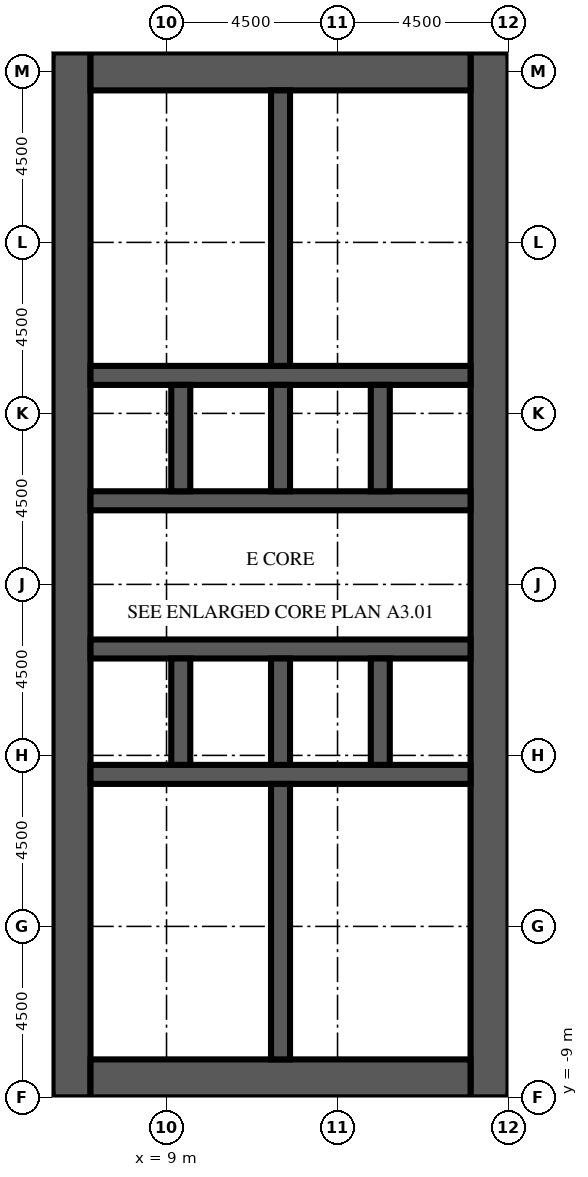
"""IFC4 building model, lengths in metres.
Left out: names, types, materials, properties, quantities, classifications, styles, units other than length and angle.
Written with IfcOpenShell. Run it as: python <this file> out.ifc"""

import sys

from ifc_helpers import new_model, si_unit, direction, frame, frame_2d, origin, place, context, subcontext, project, spatial, rectangle, extrude, element, fill, save


model = new_model("IFC4")
c1 = context("Model", 3, precision=1e-05, world=origin(), true_north=direction((0.0, 1.0)))
c2 = subcontext(c1, "Body", "Model", "MODEL_VIEW")
j1 = project(units=[si_unit("LENGTHUNIT", "METRE"), si_unit("PLANEANGLEUNIT", "RADIAN")], contexts=[c1])
p1 = place(None, origin())
s1 = spatial("IfcSite", under=j1, at=p1, CompositionType="ELEMENT")
p2 = place(p1, origin())
s2 = spatial("IfcBuilding", under=s1, at=p2, CompositionType="ELEMENT")
p3 = place(p2, frame((0.0, 0.0, -10.0)))
s3 = spatial("IfcBuildingStorey", under=s2, at=p3, CompositionType="ELEMENT", Elevation=-10.0)
p4 = place(p3, frame((6.5, -9.0, 0.0), z_axis=(0.0, 0.0, 1.0), x_axis=(0.0, 1.0, 0.0)))
e1 = element("IfcWall", 1, at=p4, inside=s3, PredefinedType="SHEAR", context=c2, shape_type="SweptSolid", body=[
    extrude(rectangle(XDim=27.5, YDim=1.0, at=frame_2d((13.75, 0.0))), origin(), (0.0, 0.0, 1.0), 5.0),
])
p5 = place(p4, frame((12.55, 0.0, 0.0)))
e2 = element("IfcOpeningElement", 2, at=p5, cuts=e1, PredefinedType="OPENING", context=c2, shape_type="SweptSolid", body=[
    extrude(rectangle(XDim=2.4, YDim=2.4, at=frame_2d((1.2, 1.2))), frame((0.0, 0.51, 0.0), z_axis=(0.0, -1.0, 0.0), x_axis=(1.0, 0.0, 0.0)), (0.0, 0.0, 1.0), 1.02),
])
p6 = place(p4, frame((4.025, 0.0, 0.0)))
e3 = element("IfcOpeningElement", 3, at=p6, cuts=e1, PredefinedType="OPENING", context=c2, shape_type="SweptSolid", body=[
    extrude(rectangle(XDim=1.2, YDim=2.1, at=frame_2d((0.6, 1.05))), frame((0.0, 0.51, 0.0), z_axis=(0.0, -1.0, 0.0), x_axis=(1.0, 0.0, 0.0)), (0.0, 0.0, 1.0), 1.02),
])
p7 = place(p4, frame((19.475, 0.0, 0.0)))
e4 = element("IfcOpeningElement", 4, at=p7, cuts=e1, PredefinedType="OPENING", context=c2, shape_type="SweptSolid", body=[
    extrude(rectangle(XDim=1.0, YDim=2.1, at=frame_2d((0.5, 1.05))), frame((0.0, 0.51, 0.0), z_axis=(0.0, -1.0, 0.0), x_axis=(1.0, 0.0, 0.0)), (0.0, 0.0, 1.0), 1.02),
])
p8 = place(p4, frame((21.106, 0.0, 0.0)))
e5 = element("IfcOpeningElement", 5, at=p8, cuts=e1, PredefinedType="OPENING", context=c2, shape_type="SweptSolid", body=[
    extrude(rectangle(XDim=1.0, YDim=2.1, at=frame_2d((0.5, 1.05))), frame((0.0, 0.51, 0.0), z_axis=(0.0, -1.0, 0.0), x_axis=(1.0, 0.0, 0.0)), (0.0, 0.0, 1.0), 1.02),
])
p9 = place(p4, frame((23.1, 0.0, 0.0)))
e6 = element("IfcOpeningElement", 6, at=p9, cuts=e1, PredefinedType="OPENING", context=c2, shape_type="SweptSolid", body=[
    extrude(rectangle(XDim=1.0, YDim=2.1, at=frame_2d((0.5, 1.05))), frame((0.0, 0.51, 0.0), z_axis=(0.0, -1.0, 0.0), x_axis=(1.0, 0.0, 0.0)), (0.0, 0.0, 1.0), 1.02),
])
p10 = place(p4, frame((25.094, 0.0, 0.0)))
e7 = element("IfcOpeningElement", 7, at=p10, cuts=e1, PredefinedType="OPENING", context=c2, shape_type="SweptSolid", body=[
    extrude(rectangle(XDim=1.0, YDim=2.1, at=frame_2d((0.5, 1.05))), frame((0.0, 0.51, 0.0), z_axis=(0.0, -1.0, 0.0), x_axis=(1.0, 0.0, 0.0)), (0.0, 0.0, 1.0), 1.02),
])
p11 = place(p3, frame((17.5, -9.0, 0.0), z_axis=(0.0, 0.0, 1.0), x_axis=(0.0, 1.0, 0.0)))
e8 = element("IfcWall", 8, at=p11, inside=s3, PredefinedType="SHEAR", context=c2, shape_type="SweptSolid", body=[
    extrude(rectangle(XDim=27.5, YDim=1.0, at=frame_2d((13.75, 0.0))), origin(), (0.0, 0.0, 1.0), 5.0),
])
p12 = place(p11, frame((12.55, 0.0, 0.0)))
e9 = element("IfcOpeningElement", 9, at=p12, cuts=e8, PredefinedType="OPENING", context=c2, shape_type="SweptSolid", body=[
    extrude(rectangle(XDim=2.4, YDim=2.4, at=frame_2d((1.2, 1.2))), frame((0.0, 0.51, 0.0), z_axis=(0.0, -1.0, 0.0), x_axis=(1.0, 0.0, 0.0)), (0.0, 0.0, 1.0), 1.02),
])
p13 = place(p11, frame((6.825, 0.0, 0.0)))
e10 = element("IfcOpeningElement", 10, at=p13, cuts=e8, PredefinedType="OPENING", context=c2, shape_type="SweptSolid", body=[
    extrude(rectangle(XDim=1.2, YDim=2.1, at=frame_2d((0.6, 1.05))), frame((0.0, 0.51, 0.0), z_axis=(0.0, -1.0, 0.0), x_axis=(1.0, 0.0, 0.0)), (0.0, 0.0, 1.0), 1.02),
])
p14 = place(p11, frame((19.475, 0.0, 0.0)))
e11 = element("IfcOpeningElement", 11, at=p14, cuts=e8, PredefinedType="OPENING", context=c2, shape_type="SweptSolid", body=[
    extrude(rectangle(XDim=1.2, YDim=2.1, at=frame_2d((0.6, 1.05))), frame((0.0, 0.51, 0.0), z_axis=(0.0, -1.0, 0.0), x_axis=(1.0, 0.0, 0.0)), (0.0, 0.0, 1.0), 1.02),
])
for number, where, z_axis, x_axis in (
    (12, (7.0, -8.5, 0.0), (0.0, 0.0, 1.0), (1.0, 0.0, 0.0)),
    (13, (7.0, 18.0, 0.0), (0.0, 0.0, 1.0), (1.0, 0.0, 0.0)),
):
    element("IfcWall", number, at=place(p3, frame(where, z_axis=z_axis, x_axis=x_axis)), inside=s3, PredefinedType="SHEAR", context=c2, shape_type="SweptSolid", body=[
        extrude(rectangle(XDim=10.0, YDim=1.0, at=frame_2d((5.0, 0.0))), origin(), (0.0, 0.0, 1.0), 5.0),
    ])
p15 = place(p3, frame((7.0, -0.5, 0.0), z_axis=(0.0, 0.0, 1.0), x_axis=(1.0, 0.0, 0.0)))
e14 = element("IfcWall", 14, at=p15, inside=s3, PredefinedType="SHEAR", context=c2, shape_type="SweptSolid", body=[
    extrude(rectangle(XDim=10.0, YDim=0.5, at=frame_2d((5.0, 0.0))), origin(), (0.0, 0.0, 1.0), 5.0),
])
p16 = place(p3, frame((7.0, 2.8, 0.0), z_axis=(0.0, 0.0, 1.0), x_axis=(1.0, 0.0, 0.0)))
e15 = element("IfcWall", 15, at=p16, inside=s3, PredefinedType="SHEAR", context=c2, shape_type="SweptSolid", body=[
    extrude(rectangle(XDim=10.0, YDim=0.5, at=frame_2d((5.0, 0.0))), origin(), (0.0, 0.0, 1.0), 5.0),
])
p17 = place(p16, frame((0.512, 0.0, 0.0)))
e16 = element("IfcOpeningElement", 16, at=p17, cuts=e15, PredefinedType="OPENING", context=c2, shape_type="SweptSolid", body=[
    extrude(rectangle(XDim=1.1, YDim=2.1, at=frame_2d((0.55, 1.05))), frame((0.0, 0.26, 0.0), z_axis=(0.0, -1.0, 0.0), x_axis=(1.0, 0.0, 0.0)), (0.0, 0.0, 1.0), 0.52),
])
p18 = place(p16, frame((3.137, 0.0, 0.0)))
e17 = element("IfcOpeningElement", 17, at=p18, cuts=e15, PredefinedType="OPENING", context=c2, shape_type="SweptSolid", body=[
    extrude(rectangle(XDim=1.1, YDim=2.1, at=frame_2d((0.55, 1.05))), frame((0.0, 0.26, 0.0), z_axis=(0.0, -1.0, 0.0), x_axis=(1.0, 0.0, 0.0)), (0.0, 0.0, 1.0), 0.52),
])
p19 = place(p16, frame((8.387, 0.0, 0.0)))
e18 = element("IfcOpeningElement", 18, at=p19, cuts=e15, PredefinedType="OPENING", context=c2, shape_type="SweptSolid", body=[
    extrude(rectangle(XDim=1.1, YDim=2.1, at=frame_2d((0.55, 1.05))), frame((0.0, 0.26, 0.0), z_axis=(0.0, -1.0, 0.0), x_axis=(1.0, 0.0, 0.0)), (0.0, 0.0, 1.0), 0.52),
])
p20 = place(p16, frame((5.812, 0.0, 0.0)))
e19 = element("IfcOpeningElement", 19, at=p20, cuts=e15, PredefinedType="OPENING", context=c2, shape_type="SweptSolid", body=[
    extrude(rectangle(XDim=1.0, YDim=2.1, at=frame_2d((0.5, 1.05))), frame((0.0, 0.26, 0.0), z_axis=(0.0, -1.0, 0.0), x_axis=(1.0, 0.0, 0.0)), (0.0, 0.0, 1.0), 0.52),
])
p21 = place(p3, frame((7.0, 6.7, 0.0), z_axis=(0.0, 0.0, 1.0), x_axis=(1.0, 0.0, 0.0)))
e20 = element("IfcWall", 20, at=p21, inside=s3, PredefinedType="SHEAR", context=c2, shape_type="SweptSolid", body=[
    extrude(rectangle(XDim=10.0, YDim=0.5, at=frame_2d((5.0, 0.0))), origin(), (0.0, 0.0, 1.0), 5.0),
])
p22 = place(p21, frame((0.512, 0.0, 0.0)))
e21 = element("IfcOpeningElement", 21, at=p22, cuts=e20, PredefinedType="OPENING", context=c2, shape_type="SweptSolid", body=[
    extrude(rectangle(XDim=1.1, YDim=2.1, at=frame_2d((0.55, 1.05))), frame((0.0, 0.26, 0.0), z_axis=(0.0, -1.0, 0.0), x_axis=(1.0, 0.0, 0.0)), (0.0, 0.0, 1.0), 0.52),
])
p23 = place(p21, frame((3.188, 0.0, 0.0)))
e22 = element("IfcOpeningElement", 22, at=p23, cuts=e20, PredefinedType="OPENING", context=c2, shape_type="SweptSolid", body=[
    extrude(rectangle(XDim=1.0, YDim=2.1, at=frame_2d((0.5, 1.05))), frame((0.0, 0.26, 0.0), z_axis=(0.0, -1.0, 0.0), x_axis=(1.0, 0.0, 0.0)), (0.0, 0.0, 1.0), 0.52),
])
p24 = place(p21, frame((5.812, 0.0, 0.0)))
e23 = element("IfcOpeningElement", 23, at=p24, cuts=e20, PredefinedType="OPENING", context=c2, shape_type="SweptSolid", body=[
    extrude(rectangle(XDim=1.0, YDim=2.1, at=frame_2d((0.5, 1.05))), frame((0.0, 0.26, 0.0), z_axis=(0.0, -1.0, 0.0), x_axis=(1.0, 0.0, 0.0)), (0.0, 0.0, 1.0), 0.52),
])
p25 = place(p21, frame((8.438, 0.0, 0.0)))
e24 = element("IfcOpeningElement", 24, at=p25, cuts=e20, PredefinedType="OPENING", context=c2, shape_type="SweptSolid", body=[
    extrude(rectangle(XDim=1.0, YDim=2.1, at=frame_2d((0.5, 1.05))), frame((0.0, 0.26, 0.0), z_axis=(0.0, -1.0, 0.0), x_axis=(1.0, 0.0, 0.0)), (0.0, 0.0, 1.0), 0.52),
])
p26 = place(p3, frame((7.0, 10.0, 0.0), z_axis=(0.0, 0.0, 1.0), x_axis=(1.0, 0.0, 0.0)))
e25 = element("IfcWall", 25, at=p26, inside=s3, PredefinedType="SHEAR", context=c2, shape_type="SweptSolid", body=[
    extrude(rectangle(XDim=10.0, YDim=0.5, at=frame_2d((5.0, 0.0))), origin(), (0.0, 0.0, 1.0), 5.0),
])
for number, where, z_axis, x_axis in (
    (26, (9.375, -0.25, 0.0), (0.0, 0.0, 1.0), (0.0, 1.0, 0.0)),
    (27, (9.375, 6.95, 0.0), (0.0, 0.0, 1.0), (0.0, 1.0, 0.0)),
    (28, (12.0, -0.25, 0.0), (0.0, 0.0, 1.0), (0.0, 1.0, 0.0)),
    (29, (12.0, 6.95, 0.0), (0.0, 0.0, 1.0), (0.0, 1.0, 0.0)),
    (30, (14.625, -0.25, 0.0), (0.0, 0.0, 1.0), (0.0, 1.0, 0.0)),
    (31, (14.625, 6.95, 0.0), (0.0, 0.0, 1.0), (0.0, 1.0, 0.0)),
):
    element("IfcWall", number, at=place(p3, frame(where, z_axis=z_axis, x_axis=x_axis)), inside=s3, PredefinedType="SHEAR", context=c2, shape_type="SweptSolid", body=[
        extrude(rectangle(XDim=2.8, YDim=0.5, at=frame_2d((1.4, 0.0))), origin(), (0.0, 0.0, 1.0), 5.0),
    ])
for number, where, z_axis, x_axis in (
    (32, (12.0, -8.0, 0.0), (0.0, 0.0, 1.0), (0.0, 1.0, 0.0)),
    (33, (12.0, 10.25, 0.0), (0.0, 0.0, 1.0), (0.0, 1.0, 0.0)),
):
    element("IfcWall", number, at=place(p3, frame(where, z_axis=z_axis, x_axis=x_axis)), inside=s3, PredefinedType="SHEAR", context=c2, shape_type="SweptSolid", body=[
        extrude(rectangle(XDim=7.25, YDim=0.5, at=frame_2d((3.625, 0.0))), origin(), (0.0, 0.0, 1.0), 5.0),
    ])
p27 = place(p3, frame((7.0, -5.825, 0.0), z_axis=(0.0, 0.0, 1.0), x_axis=(1.0, 0.0, 0.0)))
e34 = element("IfcWall", 34, at=p27, inside=s3, PredefinedType="PARTITIONING", context=c2, shape_type="SweptSolid", body=[
    extrude(rectangle(XDim=1.6, YDim=0.1, at=frame_2d((0.8, 0.0))), origin(), (0.0, 0.0, 1.0), 4.6),
])
p28 = place(p27, frame((0.3, 0.0, 0.0)))
e35 = element("IfcOpeningElement", 35, at=p28, cuts=e34, PredefinedType="OPENING", context=c2, shape_type="SweptSolid", body=[
    extrude(rectangle(XDim=1.0, YDim=2.1, at=frame_2d((0.5, 1.05))), frame((0.0, 0.06, 0.0), z_axis=(0.0, -1.0, 0.0), x_axis=(1.0, 0.0, 0.0)), (0.0, 0.0, 1.0), 0.12),
])
p29 = place(p3, frame((7.0, -2.925, 0.0), z_axis=(0.0, 0.0, 1.0), x_axis=(1.0, 0.0, 0.0)))
e36 = element("IfcWall", 36, at=p29, inside=s3, PredefinedType="PARTITIONING", context=c2, shape_type="SweptSolid", body=[
    extrude(rectangle(XDim=1.6, YDim=0.1, at=frame_2d((0.8, 0.0))), origin(), (0.0, 0.0, 1.0), 4.6),
])
p30 = place(p29, frame((0.3, 0.0, 0.0)))
e37 = element("IfcOpeningElement", 37, at=p30, cuts=e36, PredefinedType="OPENING", context=c2, shape_type="SweptSolid", body=[
    extrude(rectangle(XDim=1.0, YDim=2.1, at=frame_2d((0.5, 1.05))), frame((0.0, 0.06, 0.0), z_axis=(0.0, -1.0, 0.0), x_axis=(1.0, 0.0, 0.0)), (0.0, 0.0, 1.0), 0.12),
])
p31 = place(p3, frame((8.6, -5.825, 0.0), z_axis=(0.0, 0.0, 1.0), x_axis=(0.0, 1.0, 0.0)))
e38 = element("IfcWall", 38, at=p31, inside=s3, PredefinedType="PARTITIONING", context=c2, shape_type="SweptSolid", body=[
    extrude(rectangle(XDim=2.9, YDim=0.1, at=frame_2d((1.45, 0.0))), origin(), (0.0, 0.0, 1.0), 4.6),
])
p32 = place(p31, frame((0.95, 0.0, 0.0)))
e39 = element("IfcOpeningElement", 39, at=p32, cuts=e38, PredefinedType="OPENING", context=c2, shape_type="SweptSolid", body=[
    extrude(rectangle(XDim=1.0, YDim=2.1, at=frame_2d((0.5, 1.05))), frame((0.0, 0.06, 0.0), z_axis=(0.0, -1.0, 0.0), x_axis=(1.0, 0.0, 0.0)), (0.0, 0.0, 1.0), 0.12),
])
for number, where, z_axis, x_axis in (
    (40, (8.6, -5.825, 0.0), (0.0, 0.0, 1.0), (1.0, 0.0, 0.0)),
    (41, (8.6, -2.925, 0.0), (0.0, 0.0, 1.0), (1.0, 0.0, 0.0)),
):
    element("IfcWall", number, at=place(p3, frame(where, z_axis=z_axis, x_axis=x_axis)), inside=s3, PredefinedType="PARTITIONING", context=c2, shape_type="SweptSolid", body=[
        extrude(rectangle(XDim=3.15, YDim=0.1, at=frame_2d((1.575, 0.0))), origin(), (0.0, 0.0, 1.0), 4.6),
    ])
for number, where, z_axis, x_axis in (
    (42, (7.0, 11.7, 0.0), (0.0, 0.0, 1.0), (1.0, 0.0, 0.0)),
    (43, (7.0, 13.512, 0.0), (0.0, 0.0, 1.0), (1.0, 0.0, 0.0)),
    (44, (7.0, 15.688, 0.0), (0.0, 0.0, 1.0), (1.0, 0.0, 0.0)),
):
    element("IfcWall", number, at=place(p3, frame(where, z_axis=z_axis, x_axis=x_axis)), inside=s3, PredefinedType="PARTITIONING", context=c2, shape_type="SweptSolid", body=[
        extrude(rectangle(XDim=4.75, YDim=0.1, at=frame_2d((2.375, 0.0))), origin(), (0.0, 0.0, 1.0), 4.6),
    ])
p33 = place(p17, origin())
e45 = element("IfcDoor", 45, at=p33, inside=s3, OperationType="DOUBLE_DOOR_SLIDING", PredefinedType="DOOR", context=c2, shape_type="SweptSolid", body=[
    extrude(rectangle(XDim=1.1, YDim=2.1, at=frame_2d((0.55, 1.05))), frame((0.0, 0.025, 0.0), z_axis=(0.0, -1.0, 0.0), x_axis=(1.0, 0.0, 0.0)), (0.0, 0.0, 1.0), 0.05),
])
fill(e16, e45)
p34 = place(p18, origin())
e46 = element("IfcDoor", 46, at=p34, inside=s3, OperationType="DOUBLE_DOOR_SLIDING", PredefinedType="DOOR", context=c2, shape_type="SweptSolid", body=[
    extrude(rectangle(XDim=1.1, YDim=2.1, at=frame_2d((0.55, 1.05))), frame((0.0, 0.025, 0.0), z_axis=(0.0, -1.0, 0.0), x_axis=(1.0, 0.0, 0.0)), (0.0, 0.0, 1.0), 0.05),
])
fill(e17, e46)
p35 = place(p19, origin())
e47 = element("IfcDoor", 47, at=p35, inside=s3, OperationType="DOUBLE_DOOR_SLIDING", PredefinedType="DOOR", context=c2, shape_type="SweptSolid", body=[
    extrude(rectangle(XDim=1.1, YDim=2.1, at=frame_2d((0.55, 1.05))), frame((0.0, 0.025, 0.0), z_axis=(0.0, -1.0, 0.0), x_axis=(1.0, 0.0, 0.0)), (0.0, 0.0, 1.0), 0.05),
])
fill(e18, e47)
p36 = place(p22, origin())
e48 = element("IfcDoor", 48, at=p36, inside=s3, OperationType="DOUBLE_DOOR_SLIDING", PredefinedType="DOOR", context=c2, shape_type="SweptSolid", body=[
    extrude(rectangle(XDim=1.1, YDim=2.1, at=frame_2d((0.55, 1.05))), frame((0.0, 0.025, 0.0), z_axis=(0.0, -1.0, 0.0), x_axis=(1.0, 0.0, 0.0)), (0.0, 0.0, 1.0), 0.05),
])
fill(e21, e48)
p37 = place(p5, origin())
e49 = element("IfcDoor", 49, at=p37, inside=s3, OperationType="DOUBLE_DOOR_DOUBLE_SWING", PredefinedType="DOOR", context=c2, shape_type="SweptSolid", body=[
    extrude(rectangle(XDim=2.4, YDim=2.4, at=frame_2d((1.2, 1.2))), frame((0.0, 0.025, 0.0), z_axis=(0.0, -1.0, 0.0), x_axis=(1.0, 0.0, 0.0)), (0.0, 0.0, 1.0), 0.05),
])
fill(e2, e49)
p38 = place(p12, origin())
e50 = element("IfcDoor", 50, at=p38, inside=s3, OperationType="DOUBLE_DOOR_DOUBLE_SWING", PredefinedType="DOOR", context=c2, shape_type="SweptSolid", body=[
    extrude(rectangle(XDim=2.4, YDim=2.4, at=frame_2d((1.2, 1.2))), frame((0.0, 0.025, 0.0), z_axis=(0.0, -1.0, 0.0), x_axis=(1.0, 0.0, 0.0)), (0.0, 0.0, 1.0), 0.05),
])
fill(e9, e50)
p39 = place(p13, frame((1.2, 0.0, 0.0), z_axis=(0.0, 0.0, 1.0), x_axis=(-1.0, 0.0, 0.0)))
e51 = element("IfcDoor", 51, at=p39, inside=s3, OperationType="SINGLE_SWING_LEFT", PredefinedType="DOOR", context=c2, shape_type="SweptSolid", body=[
    extrude(rectangle(XDim=1.2, YDim=2.1, at=frame_2d((0.6, 1.05))), frame((0.0, 0.025, 0.0), z_axis=(0.0, -1.0, 0.0), x_axis=(1.0, 0.0, 0.0)), (0.0, 0.0, 1.0), 0.05),
])
fill(e10, e51)
p40 = place(p14, frame((1.2, 0.0, 0.0), z_axis=(0.0, 0.0, 1.0), x_axis=(-1.0, 0.0, 0.0)))
e52 = element("IfcDoor", 52, at=p40, inside=s3, OperationType="SINGLE_SWING_LEFT", PredefinedType="DOOR", context=c2, shape_type="SweptSolid", body=[
    extrude(rectangle(XDim=1.2, YDim=2.1, at=frame_2d((0.6, 1.05))), frame((0.0, 0.025, 0.0), z_axis=(0.0, -1.0, 0.0), x_axis=(1.0, 0.0, 0.0)), (0.0, 0.0, 1.0), 0.05),
])
fill(e11, e52)
p41 = place(p20, origin())
e53 = element("IfcDoor", 53, at=p41, inside=s3, OperationType="SINGLE_SWING_LEFT", PredefinedType="DOOR", context=c2, shape_type="SweptSolid", body=[
    extrude(rectangle(XDim=1.0, YDim=2.1, at=frame_2d((0.5, 1.05))), frame((0.0, 0.025, 0.0), z_axis=(0.0, -1.0, 0.0), x_axis=(1.0, 0.0, 0.0)), (0.0, 0.0, 1.0), 0.05),
])
fill(e19, e53)
p42 = place(p23, origin())
e54 = element("IfcDoor", 54, at=p42, inside=s3, OperationType="SINGLE_SWING_RIGHT", PredefinedType="DOOR", context=c2, shape_type="SweptSolid", body=[
    extrude(rectangle(XDim=1.0, YDim=2.1, at=frame_2d((0.5, 1.05))), frame((0.0, 0.025, 0.0), z_axis=(0.0, -1.0, 0.0), x_axis=(1.0, 0.0, 0.0)), (0.0, 0.0, 1.0), 0.05),
])
fill(e22, e54)
p43 = place(p24, origin())
e55 = element("IfcDoor", 55, at=p43, inside=s3, OperationType="SINGLE_SWING_LEFT", PredefinedType="DOOR", context=c2, shape_type="SweptSolid", body=[
    extrude(rectangle(XDim=1.0, YDim=2.1, at=frame_2d((0.5, 1.05))), frame((0.0, 0.025, 0.0), z_axis=(0.0, -1.0, 0.0), x_axis=(1.0, 0.0, 0.0)), (0.0, 0.0, 1.0), 0.05),
])
fill(e23, e55)
p44 = place(p25, origin())
e56 = element("IfcDoor", 56, at=p44, inside=s3, OperationType="SINGLE_SWING_RIGHT", PredefinedType="DOOR", context=c2, shape_type="SweptSolid", body=[
    extrude(rectangle(XDim=1.0, YDim=2.1, at=frame_2d((0.5, 1.05))), frame((0.0, 0.025, 0.0), z_axis=(0.0, -1.0, 0.0), x_axis=(1.0, 0.0, 0.0)), (0.0, 0.0, 1.0), 0.05),
])
fill(e24, e56)
p45 = place(p6, origin())
e57 = element("IfcDoor", 57, at=p45, inside=s3, OperationType="SINGLE_SWING_RIGHT", PredefinedType="DOOR", context=c2, shape_type="SweptSolid", body=[
    extrude(rectangle(XDim=1.2, YDim=2.1, at=frame_2d((0.6, 1.05))), frame((0.0, -0.425, 0.0), z_axis=(0.0, -1.0, 0.0), x_axis=(1.0, 0.0, 0.0)), (0.0, 0.0, 1.0), 0.05),
])
fill(e3, e57)
p46 = place(p28, origin())
e58 = element("IfcDoor", 58, at=p46, inside=s3, OperationType="SINGLE_SWING_LEFT", PredefinedType="DOOR", context=c2, shape_type="SweptSolid", body=[
    extrude(rectangle(XDim=1.0, YDim=2.1, at=frame_2d((0.5, 1.05))), frame((0.0, 0.025, 0.0), z_axis=(0.0, -1.0, 0.0), x_axis=(1.0, 0.0, 0.0)), (0.0, 0.0, 1.0), 0.05),
])
fill(e35, e58)
p47 = place(p30, origin())
e59 = element("IfcDoor", 59, at=p47, inside=s3, OperationType="SINGLE_SWING_RIGHT", PredefinedType="DOOR", context=c2, shape_type="SweptSolid", body=[
    extrude(rectangle(XDim=1.0, YDim=2.1, at=frame_2d((0.5, 1.05))), frame((0.0, 0.025, 0.0), z_axis=(0.0, -1.0, 0.0), x_axis=(1.0, 0.0, 0.0)), (0.0, 0.0, 1.0), 0.05),
])
fill(e37, e59)
p48 = place(p32, origin())
e60 = element("IfcDoor", 60, at=p48, inside=s3, OperationType="SINGLE_SWING_LEFT", PredefinedType="DOOR", context=c2, shape_type="SweptSolid", body=[
    extrude(rectangle(XDim=1.0, YDim=2.1, at=frame_2d((0.5, 1.05))), frame((0.0, 0.025, 0.0), z_axis=(0.0, -1.0, 0.0), x_axis=(1.0, 0.0, 0.0)), (0.0, 0.0, 1.0), 0.05),
])
fill(e39, e60)
p49 = place(p7, origin())
e61 = element("IfcDoor", 61, at=p49, inside=s3, OperationType="SINGLE_SWING_RIGHT", PredefinedType="DOOR", context=c2, shape_type="SweptSolid", body=[
    extrude(rectangle(XDim=1.0, YDim=2.1, at=frame_2d((0.5, 1.05))), frame((0.0, -0.425, 0.0), z_axis=(0.0, -1.0, 0.0), x_axis=(1.0, 0.0, 0.0)), (0.0, 0.0, 1.0), 0.05),
])
fill(e4, e61)
p50 = place(p8, origin())
e62 = element("IfcDoor", 62, at=p50, inside=s3, OperationType="SINGLE_SWING_LEFT", PredefinedType="DOOR", context=c2, shape_type="SweptSolid", body=[
    extrude(rectangle(XDim=1.0, YDim=2.1, at=frame_2d((0.5, 1.05))), frame((0.0, -0.425, 0.0), z_axis=(0.0, -1.0, 0.0), x_axis=(1.0, 0.0, 0.0)), (0.0, 0.0, 1.0), 0.05),
])
fill(e5, e62)
p51 = place(p9, origin())
e63 = element("IfcDoor", 63, at=p51, inside=s3, OperationType="SINGLE_SWING_RIGHT", PredefinedType="DOOR", context=c2, shape_type="SweptSolid", body=[
    extrude(rectangle(XDim=1.0, YDim=2.1, at=frame_2d((0.5, 1.05))), frame((0.0, -0.425, 0.0), z_axis=(0.0, -1.0, 0.0), x_axis=(1.0, 0.0, 0.0)), (0.0, 0.0, 1.0), 0.05),
])
fill(e6, e63)
p52 = place(p10, origin())
e64 = element("IfcDoor", 64, at=p52, inside=s3, OperationType="SINGLE_SWING_LEFT", PredefinedType="DOOR", context=c2, shape_type="SweptSolid", body=[
    extrude(rectangle(XDim=1.0, YDim=2.1, at=frame_2d((0.5, 1.05))), frame((0.0, -0.425, 0.0), z_axis=(0.0, -1.0, 0.0), x_axis=(1.0, 0.0, 0.0)), (0.0, 0.0, 1.0), 0.05),
])
fill(e7, e64)
save(model, sys.argv[1])
